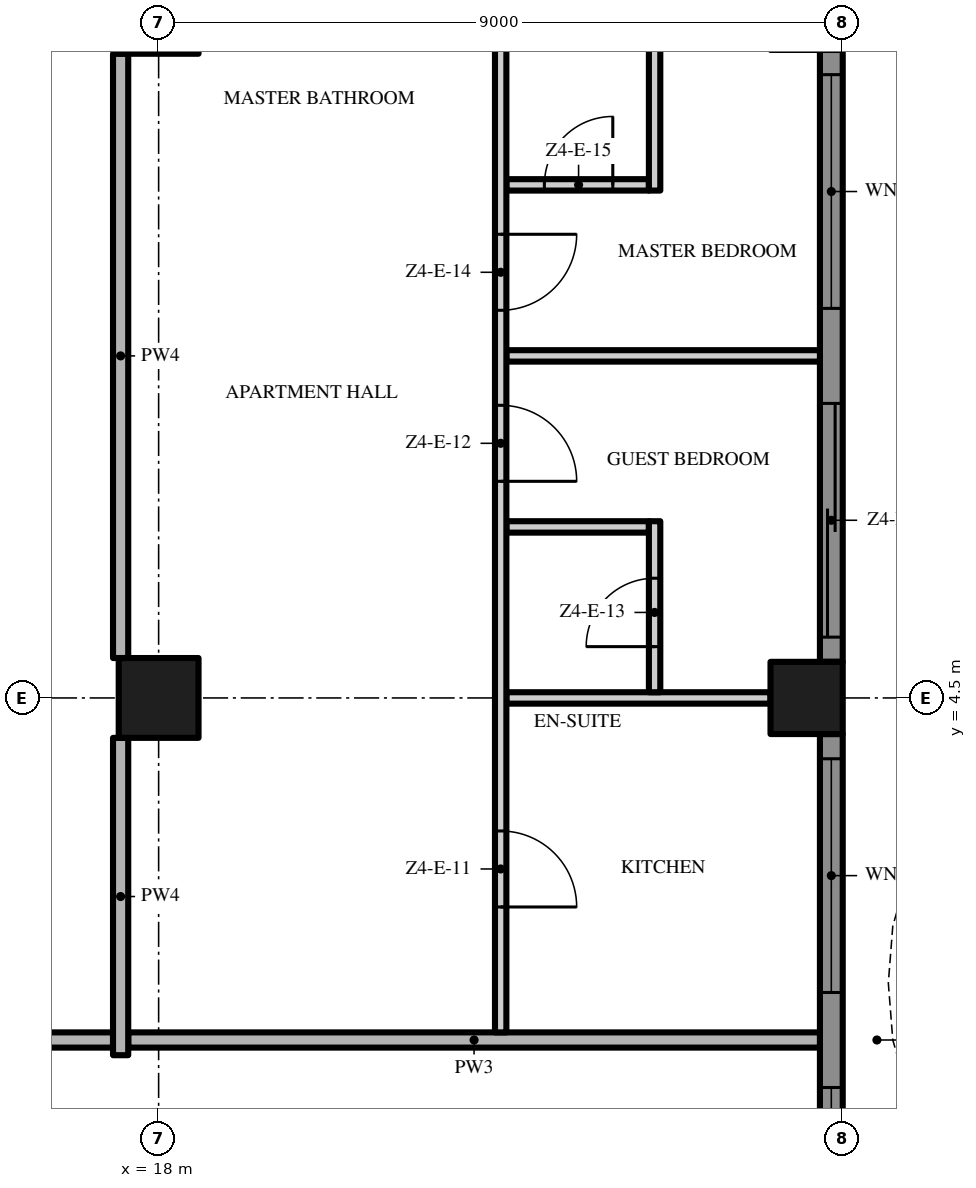
"""IFC4 building model, lengths in metres.
Left out: names, types, materials, properties, quantities, classifications, styles, units other than length and angle.
Written with IfcOpenShell. Run it as: python <this file> out.ifc"""

import sys

from ifc_helpers import new_model, si_unit, direction, frame, frame_2d, origin, origin_2d, place, context, subcontext, project, spatial, polyline, rectangle, outline, extrude, element, fill, save


model = new_model("IFC4")
c1 = context("Model", 3, precision=1e-05, world=origin(), true_north=direction((0.0, 1.0)))
c2 = subcontext(c1, "Body", "Model", "MODEL_VIEW")
j1 = project(units=[si_unit("LENGTHUNIT", "METRE"), si_unit("PLANEANGLEUNIT", "RADIAN")], contexts=[c1])
p1 = place(None, origin())
s1 = spatial("IfcSite", under=j1, at=p1, CompositionType="ELEMENT")
p2 = place(p1, origin())
s2 = spatial("IfcBuilding", under=s1, at=p2, CompositionType="ELEMENT")
p3 = place(p2, frame((0.0, 0.0, 226.2)))
s3 = spatial("IfcBuildingStorey", under=s2, at=p3, CompositionType="ELEMENT", Elevation=226.2)
for number, where, z_axis, x_axis in (
    (1, (18.0, 13.5, 0.0), (0.0, 0.0, 1.0), (1.0, 0.0, 0.0)),
    (2, (18.0, 4.5, 0.0), (0.0, 0.0, 1.0), (1.0, 0.0, 0.0)),
):
    element("IfcColumn", number, at=place(p3, frame(where, z_axis=z_axis, x_axis=x_axis)), inside=s3, PredefinedType="COLUMN", context=c2, shape_type="SweptSolid", body=[
        extrude(rectangle(XDim=1.05, YDim=1.05, at=origin_2d()), origin(), (0.0, 0.0, 1.0), 3.5),
    ])
p4 = place(p3, frame((26.525, 4.5, 0.0), z_axis=(0.0, 0.0, 1.0), x_axis=(1.0, 0.0, 0.0)))
e3 = element("IfcColumn", 3, at=p4, inside=s3, PredefinedType="COLUMN", context=c2, shape_type="SweptSolid", body=[
    extrude(rectangle(XDim=0.95, YDim=0.95, at=origin_2d()), origin(), (0.0, 0.0, 1.0), 3.5),
])
p5 = place(p3, frame((26.85, 4.025, 0.0), z_axis=(0.0, 0.0, 1.0), x_axis=(0.0, -1.0, 0.0)))
e4 = element("IfcWall", 4, at=p5, inside=s3, PredefinedType="SOLIDWALL", context=c2, shape_type="SweptSolid", body=[
    extrude(rectangle(XDim=8.05, YDim=0.3, at=frame_2d((4.025, 0.0))), origin(), (0.0, 0.0, 1.0), 3.5),
])
p6 = place(p5, frame((4.65, 0.0, 0.45)))
e5 = element("IfcOpeningElement", 5, at=p6, cuts=e4, PredefinedType="OPENING", context=c2, shape_type="SweptSolid", body=[
    extrude(rectangle(XDim=3.075, YDim=2.65, at=frame_2d((1.538, 1.325))), frame((0.0, 0.16, 0.0), z_axis=(0.0, -1.0, 0.0), x_axis=(1.0, 0.0, 0.0)), (0.0, 0.0, 1.0), 0.32),
])
p7 = place(p5, frame((0.325, 0.0, 0.45)))
e6 = element("IfcOpeningElement", 6, at=p7, cuts=e4, PredefinedType="OPENING", context=c2, shape_type="SweptSolid", body=[
    extrude(rectangle(XDim=3.075, YDim=2.65, at=frame_2d((1.538, 1.325))), frame((0.0, 0.16, 0.0), z_axis=(0.0, -1.0, 0.0), x_axis=(1.0, 0.0, 0.0)), (0.0, 0.0, 1.0), 0.32),
])
p8 = place(p3, frame((26.85, 13.025, 0.0), z_axis=(0.0, 0.0, 1.0), x_axis=(0.0, -1.0, 0.0)))
e7 = element("IfcWall", 7, at=p8, inside=s3, PredefinedType="SOLIDWALL", context=c2, shape_type="SweptSolid", body=[
    extrude(rectangle(XDim=8.05, YDim=0.3, at=frame_2d((4.025, 0.0))), origin(), (0.0, 0.0, 1.0), 3.5),
])
p9 = place(p8, frame((4.65, 0.0, 0.0)))
e8 = element("IfcOpeningElement", 8, at=p9, cuts=e7, PredefinedType="OPENING", context=c2, shape_type="SweptSolid", body=[
    extrude(rectangle(XDim=3.075, YDim=2.4, at=frame_2d((1.538, 1.2))), frame((0.0, 0.16, 0.0), z_axis=(0.0, -1.0, 0.0), x_axis=(1.0, 0.0, 0.0)), (0.0, 0.0, 1.0), 0.32),
])
p10 = place(p8, frame((0.325, 0.0, 0.45)))
e9 = element("IfcOpeningElement", 9, at=p10, cuts=e7, PredefinedType="OPENING", context=c2, shape_type="SweptSolid", body=[
    extrude(rectangle(XDim=3.075, YDim=2.65, at=frame_2d((1.538, 1.325))), frame((0.0, 0.16, 0.0), z_axis=(0.0, -1.0, 0.0), x_axis=(1.0, 0.0, 0.0)), (0.0, 0.0, 1.0), 0.32),
])
p11 = place(p3, origin())
e10 = element("IfcWall", 10, at=p11, inside=s3, PredefinedType="USERDEFINED", context=c2, shape_type="SweptSolid", body=[
    extrude(outline(polyline([(28.8, -18.0), (28.095, -16.5), (27.659, -15.0), (27.6, -14.25), (27.659, -13.5), (28.095, -12.0), (28.8, -10.5), (29.505, -9.0), (29.941, -7.5), (30.0, -6.75), (29.941, -6.0), (29.505, -4.5), (28.8, -3.0), (28.095, -1.5), (27.659, 0.0), (27.6, 0.75), (27.659, 1.5), (28.095, 3.0), (28.8, 4.5), (29.505, 6.0), (29.941, 7.5), (30.0, 8.25), (29.941, 9.0), (29.505, 10.5), (28.8, 12.0), (28.095, 13.5), (27.659, 15.0), (27.6, 15.75), (27.659, 16.5), (28.095, 18.0), (27.855, 18.07), (27.411, 16.545), (27.349, 15.75), (27.411, 14.955), (27.86, 13.411), (28.574, 11.894), (29.271, 10.411), (29.694, 8.955), (29.749, 8.25), (29.694, 7.545), (29.271, 6.089), (28.574, 4.606), (27.86, 3.089), (27.411, 1.545), (27.349, 0.75), (27.411, -0.045), (27.86, -1.589), (28.574, -3.106), (29.271, -4.589), (29.694, -6.045), (29.749, -6.75), (29.694, -7.455), (29.271, -8.911), (28.574, -10.394), (27.86, -11.911), (27.411, -13.455), (27.349, -14.25), (27.411, -15.045), (27.86, -16.589), (28.574, -18.106), (28.8, -18.0)])), origin(), (0.0, 0.0, 1.0), 0.9),
])
p12 = place(p3, frame((17.4, 0.0, 0.0), z_axis=(0.0, 0.0, 1.0), x_axis=(-1.0, 0.0, 0.0)))
e11 = element("IfcWall", 11, at=p12, inside=s3, PredefinedType="PARTITIONING", context=c2, shape_type="SweptSolid", body=[
    extrude(rectangle(XDim=17.3, YDim=0.2, at=frame_2d((8.65, 0.0))), origin(), (0.0, 0.0, 1.0), 3.5),
])
p13 = place(p12, frame((7.65, 0.0, 0.0)))
e12 = element("IfcOpeningElement", 12, at=p13, cuts=e11, PredefinedType="OPENING", context=c2, shape_type="SweptSolid", body=[
    extrude(rectangle(XDim=1.5, YDim=2.4, at=frame_2d((0.75, 1.2))), frame((0.0, 0.11, 0.0), z_axis=(0.0, -1.0, 0.0), x_axis=(1.0, 0.0, 0.0)), (0.0, 0.0, 1.0), 0.22),
])
p14 = place(p3, frame((17.6, 0.0, 0.0), z_axis=(0.0, 0.0, 1.0), x_axis=(1.0, 0.0, 0.0)))
e13 = element("IfcWall", 13, at=p14, inside=s3, PredefinedType="PARTITIONING", context=c2, shape_type="SweptSolid", body=[
    extrude(rectangle(XDim=9.1, YDim=0.2, at=frame_2d((4.55, 0.0))), origin(), (0.0, 0.0, 1.0), 3.5),
])
p15 = place(p3, frame((22.575, 4.5, 0.0), z_axis=(0.0, 0.0, 1.0), x_axis=(1.0, 0.0, 0.0)))
e14 = element("IfcWall", 14, at=p15, inside=s3, PredefinedType="PARTITIONING", context=c2, shape_type="SweptSolid", body=[
    extrude(rectangle(XDim=3.475, YDim=0.15, at=frame_2d((1.738, 0.0))), origin(), (0.0, 0.0, 1.0), 3.5),
])
p16 = place(p3, frame((22.575, 6.75, 0.0), z_axis=(0.0, 0.0, 1.0), x_axis=(1.0, 0.0, 0.0)))
e15 = element("IfcWall", 15, at=p16, inside=s3, PredefinedType="PARTITIONING", context=c2, shape_type="SweptSolid", body=[
    extrude(rectangle(XDim=1.875, YDim=0.15, at=frame_2d((0.938, 0.0))), origin(), (0.0, 0.0, 1.0), 3.5),
])
p17 = place(p3, frame((22.575, 9.0, 0.0), z_axis=(0.0, 0.0, 1.0), x_axis=(1.0, 0.0, 0.0)))
e16 = element("IfcWall", 16, at=p17, inside=s3, PredefinedType="PARTITIONING", context=c2, shape_type="SweptSolid", body=[
    extrude(rectangle(XDim=4.125, YDim=0.15, at=frame_2d((2.062, 0.0))), origin(), (0.0, 0.0, 1.0), 3.5),
])
p18 = place(p3, frame((22.575, 11.25, 0.0), z_axis=(0.0, 0.0, 1.0), x_axis=(1.0, 0.0, 0.0)))
e17 = element("IfcWall", 17, at=p18, inside=s3, PredefinedType="PARTITIONING", context=c2, shape_type="SweptSolid", body=[
    extrude(rectangle(XDim=1.875, YDim=0.15, at=frame_2d((0.938, 0.0))), origin(), (0.0, 0.0, 1.0), 3.5),
])
p19 = place(p18, frame((0.5, 0.0, 0.0)))
e18 = element("IfcOpeningElement", 18, at=p19, cuts=e17, PredefinedType="OPENING", context=c2, shape_type="SweptSolid", body=[
    extrude(rectangle(XDim=0.9, YDim=2.1, at=frame_2d((0.45, 1.05))), frame((0.0, 0.085, 0.0), z_axis=(0.0, -1.0, 0.0), x_axis=(1.0, 0.0, 0.0)), (0.0, 0.0, 1.0), 0.17),
])
p20 = place(p3, frame((17.5, -0.2, 0.0), z_axis=(0.0, 0.0, 1.0), x_axis=(0.0, 1.0, 0.0)))
e19 = element("IfcWall", 19, at=p20, inside=s3, PredefinedType="PARTITIONING", context=c2, shape_type="SweptSolid", body=[
    extrude(rectangle(XDim=4.175, YDim=0.2, at=frame_2d((2.087, 0.0))), origin(), (0.0, 0.0, 1.0), 3.5),
])
p21 = place(p3, frame((17.5, 5.025, 0.0), z_axis=(0.0, 0.0, 1.0), x_axis=(0.0, 1.0, 0.0)))
e20 = element("IfcWall", 20, at=p21, inside=s3, PredefinedType="PARTITIONING", context=c2, shape_type="SweptSolid", body=[
    extrude(rectangle(XDim=7.95, YDim=0.2, at=frame_2d((3.975, 0.0))), origin(), (0.0, 0.0, 1.0), 3.5),
])
p22 = place(p3, frame((22.5, 17.525, 0.0), z_axis=(0.0, 0.0, 1.0), x_axis=(0.0, -1.0, 0.0)))
e21 = element("IfcWall", 21, at=p22, inside=s3, PredefinedType="PARTITIONING", context=c2, shape_type="SweptSolid", body=[
    extrude(rectangle(XDim=17.425, YDim=0.15, at=frame_2d((8.713, 0.0))), origin(), (0.0, 0.0, 1.0), 3.5),
])
p23 = place(p22, frame((14.775, 0.0, 0.0)))
e22 = element("IfcOpeningElement", 22, at=p23, cuts=e21, PredefinedType="OPENING", context=c2, shape_type="SweptSolid", body=[
    extrude(rectangle(XDim=1.0, YDim=2.4, at=frame_2d((0.5, 1.2))), frame((0.0, 0.085, 0.0), z_axis=(0.0, -1.0, 0.0), x_axis=(1.0, 0.0, 0.0)), (0.0, 0.0, 1.0), 0.17),
])
p24 = place(p22, frame((9.175, 0.0, 0.0)))
e23 = element("IfcOpeningElement", 23, at=p24, cuts=e21, PredefinedType="OPENING", context=c2, shape_type="SweptSolid", body=[
    extrude(rectangle(XDim=1.0, YDim=2.4, at=frame_2d((0.5, 1.2))), frame((0.0, 0.085, 0.0), z_axis=(0.0, -1.0, 0.0), x_axis=(1.0, 0.0, 0.0)), (0.0, 0.0, 1.0), 0.17),
])
p25 = place(p22, frame((6.925, 0.0, 0.0)))
e24 = element("IfcOpeningElement", 24, at=p25, cuts=e21, PredefinedType="OPENING", context=c2, shape_type="SweptSolid", body=[
    extrude(rectangle(XDim=1.0, YDim=2.4, at=frame_2d((0.5, 1.2))), frame((0.0, 0.085, 0.0), z_axis=(0.0, -1.0, 0.0), x_axis=(1.0, 0.0, 0.0)), (0.0, 0.0, 1.0), 0.17),
])
p26 = place(p3, frame((24.525, 4.575, 0.0), z_axis=(0.0, 0.0, 1.0), x_axis=(0.0, 1.0, 0.0)))
e25 = element("IfcWall", 25, at=p26, inside=s3, PredefinedType="PARTITIONING", context=c2, shape_type="SweptSolid", body=[
    extrude(rectangle(XDim=2.25, YDim=0.15, at=frame_2d((1.125, 0.0))), origin(), (0.0, 0.0, 1.0), 3.5),
])
p27 = place(p26, frame((0.6, 0.0, 0.0)))
e26 = element("IfcOpeningElement", 26, at=p27, cuts=e25, PredefinedType="OPENING", context=c2, shape_type="SweptSolid", body=[
    extrude(rectangle(XDim=0.9, YDim=2.1, at=frame_2d((0.45, 1.05))), frame((0.0, 0.085, 0.0), z_axis=(0.0, -1.0, 0.0), x_axis=(1.0, 0.0, 0.0)), (0.0, 0.0, 1.0), 0.17),
])
p28 = place(p3, frame((24.525, 11.175, 0.0), z_axis=(0.0, 0.0, 1.0), x_axis=(0.0, 1.0, 0.0)))
e27 = element("IfcWall", 27, at=p28, inside=s3, PredefinedType="PARTITIONING", context=c2, shape_type="SweptSolid", body=[
    extrude(rectangle(XDim=4.65, YDim=0.15, at=frame_2d((2.325, 0.0))), origin(), (0.0, 0.0, 1.0), 3.5),
])
p29 = place(p6, origin())
e28 = element("IfcWindow", 28, at=p29, inside=s3, PartitioningType="SINGLE_PANEL", PredefinedType="WINDOW", context=c2, shape_type="SweptSolid", body=[
    extrude(rectangle(XDim=3.075, YDim=2.65, at=frame_2d((1.538, 1.325))), frame((0.0, 0.03, 0.0), z_axis=(0.0, -1.0, 0.0), x_axis=(1.0, 0.0, 0.0)), (0.0, 0.0, 1.0), 0.06),
])
fill(e5, e28)
p30 = place(p7, origin())
e29 = element("IfcWindow", 29, at=p30, inside=s3, PartitioningType="SINGLE_PANEL", PredefinedType="WINDOW", context=c2, shape_type="SweptSolid", body=[
    extrude(rectangle(XDim=3.075, YDim=2.65, at=frame_2d((1.538, 1.325))), frame((0.0, 0.03, 0.0), z_axis=(0.0, -1.0, 0.0), x_axis=(1.0, 0.0, 0.0)), (0.0, 0.0, 1.0), 0.06),
])
fill(e6, e29)
p31 = place(p9, origin())
e30 = element("IfcDoor", 30, at=p31, inside=s3, OperationType="SINGLE_SWING_LEFT", PredefinedType="DOOR", context=c2, shape_type="SweptSolid", body=[
    extrude(rectangle(XDim=3.075, YDim=2.4, at=frame_2d((1.538, 1.2))), frame((0.0, 0.025, 0.0), z_axis=(0.0, -1.0, 0.0), x_axis=(1.0, 0.0, 0.0)), (0.0, 0.0, 1.0), 0.05),
])
fill(e8, e30)
p32 = place(p10, origin())
e31 = element("IfcWindow", 31, at=p32, inside=s3, PartitioningType="SINGLE_PANEL", PredefinedType="WINDOW", context=c2, shape_type="SweptSolid", body=[
    extrude(rectangle(XDim=3.075, YDim=2.65, at=frame_2d((1.538, 1.325))), frame((0.0, 0.03, 0.0), z_axis=(0.0, -1.0, 0.0), x_axis=(1.0, 0.0, 0.0)), (0.0, 0.0, 1.0), 0.06),
])
fill(e9, e31)
p33 = place(p23, origin())
e32 = element("IfcDoor", 32, at=p33, inside=s3, OperationType="SINGLE_SWING_RIGHT", PredefinedType="DOOR", context=c2, shape_type="SweptSolid", body=[
    extrude(rectangle(XDim=1.0, YDim=2.4, at=frame_2d((0.5, 1.2))), frame((0.0, 0.025, 0.0), z_axis=(0.0, -1.0, 0.0), x_axis=(1.0, 0.0, 0.0)), (0.0, 0.0, 1.0), 0.05),
])
fill(e22, e32)
p34 = place(p24, origin())
e33 = element("IfcDoor", 33, at=p34, inside=s3, OperationType="SINGLE_SWING_RIGHT", PredefinedType="DOOR", context=c2, shape_type="SweptSolid", body=[
    extrude(rectangle(XDim=1.0, YDim=2.4, at=frame_2d((0.5, 1.2))), frame((0.0, 0.025, 0.0), z_axis=(0.0, -1.0, 0.0), x_axis=(1.0, 0.0, 0.0)), (0.0, 0.0, 1.0), 0.05),
])
fill(e23, e33)
p35 = place(p27, origin())
e34 = element("IfcDoor", 34, at=p35, inside=s3, OperationType="SINGLE_SWING_LEFT", PredefinedType="DOOR", context=c2, shape_type="SweptSolid", body=[
    extrude(rectangle(XDim=0.9, YDim=2.1, at=frame_2d((0.45, 1.05))), frame((0.0, 0.025, 0.0), z_axis=(0.0, -1.0, 0.0), x_axis=(1.0, 0.0, 0.0)), (0.0, 0.0, 1.0), 0.05),
])
fill(e26, e34)
p36 = place(p25, origin())
e35 = element("IfcDoor", 35, at=p36, inside=s3, OperationType="SINGLE_SWING_LEFT", PredefinedType="DOOR", context=c2, shape_type="SweptSolid", body=[
    extrude(rectangle(XDim=1.0, YDim=2.4, at=frame_2d((0.5, 1.2))), frame((0.0, 0.025, 0.0), z_axis=(0.0, -1.0, 0.0), x_axis=(1.0, 0.0, 0.0)), (0.0, 0.0, 1.0), 0.05),
])
fill(e24, e35)
p37 = place(p19, origin())
e36 = element("IfcDoor", 36, at=p37, inside=s3, OperationType="SINGLE_SWING_RIGHT", PredefinedType="DOOR", context=c2, shape_type="SweptSolid", body=[
    extrude(rectangle(XDim=0.9, YDim=2.1, at=frame_2d((0.45, 1.05))), frame((0.0, 0.025, 0.0), z_axis=(0.0, -1.0, 0.0), x_axis=(1.0, 0.0, 0.0)), (0.0, 0.0, 1.0), 0.05),
])
fill(e18, e36)
save(model, sys.argv[1])
